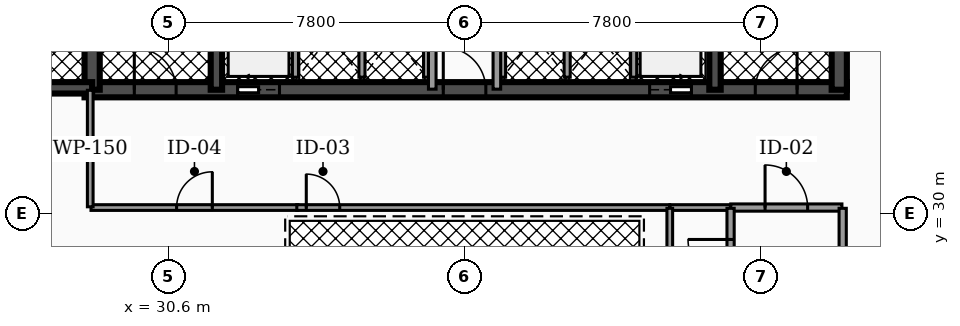
"""IFC4 building model, lengths in metres.
Left out: names, types, materials, properties, quantities, classifications, styles, units other than length and angle.
Written with IfcOpenShell. Run it as: python <this file> out.ifc"""

import sys

from ifc_helpers import new_model, si_unit, direction, frame, frame_2d, origin, place, context, subcontext, project, spatial, rectangle, extrude, element, fill, save


model = new_model("IFC4")
c1 = context("Model", 3, precision=1e-05, world=origin(), true_north=direction((0.0, 1.0)))
c2 = subcontext(c1, "Body", "Model", "MODEL_VIEW")
j1 = project(units=[si_unit("LENGTHUNIT", "METRE"), si_unit("PLANEANGLEUNIT", "RADIAN")], contexts=[c1])
p1 = place(None, origin())
s1 = spatial("IfcSite", under=j1, at=p1, CompositionType="ELEMENT")
p2 = place(p1, origin())
s2 = spatial("IfcBuilding", under=s1, at=p2, CompositionType="ELEMENT")
p3 = place(p2, frame((0.0, 0.0, 80.58)))
s3 = spatial("IfcBuildingStorey", under=s2, at=p3, CompositionType="ELEMENT", Elevation=80.58)
p4 = place(p3, frame((28.4, 33.25, 0.0), z_axis=(0.0, 0.0, 1.0), x_axis=(1.0, 0.0, 0.0)))
e1 = element("IfcWall", 1, at=p4, inside=s3, PredefinedType="SHEAR", context=c2, shape_type="SweptSolid", body=[
    extrude(rectangle(XDim=20.06, YDim=0.4, at=frame_2d((10.03, 0.0))), origin(), (0.0, 0.0, 1.0), 3.82),
])
p5 = place(p4, frame((4.03, 0.0, 0.0)))
e2 = element("IfcOpeningElement", 2, at=p5, cuts=e1, PredefinedType="OPENING", context=c2, shape_type="SweptSolid", body=[
    extrude(rectangle(XDim=1.1, YDim=2.15, at=frame_2d((0.55, 1.075))), frame((0.0, 0.21, 0.0), z_axis=(0.0, -1.0, 0.0), x_axis=(1.0, 0.0, 0.0)), (0.0, 0.0, 1.0), 0.42),
])
p6 = place(p4, frame((14.87, 0.0, 0.0)))
e3 = element("IfcOpeningElement", 3, at=p6, cuts=e1, PredefinedType="OPENING", context=c2, shape_type="SweptSolid", body=[
    extrude(rectangle(XDim=1.1, YDim=2.15, at=frame_2d((0.55, 1.075))), frame((0.0, 0.21, 0.0), z_axis=(0.0, -1.0, 0.0), x_axis=(1.0, 0.0, 0.0)), (0.0, 0.0, 1.0), 0.42),
])
p7 = place(p4, frame((1.31, 0.0, 0.0)))
e4 = element("IfcOpeningElement", 4, at=p7, cuts=e1, PredefinedType="OPENING", context=c2, shape_type="SweptSolid", body=[
    extrude(rectangle(XDim=1.1, YDim=2.2, at=frame_2d((0.55, 1.1))), frame((0.0, 0.21, 0.0), z_axis=(0.0, -1.0, 0.0), x_axis=(1.0, 0.0, 0.0)), (0.0, 0.0, 1.0), 0.42),
])
p8 = place(p4, frame((9.44, 0.0, 0.0)))
e5 = element("IfcOpeningElement", 5, at=p8, cuts=e1, PredefinedType="OPENING", context=c2, shape_type="SweptSolid", body=[
    extrude(rectangle(XDim=1.12, YDim=2.05, at=frame_2d((0.56, 1.025))), frame((0.0, 0.21, 0.0), z_axis=(0.0, -1.0, 0.0), x_axis=(1.0, 0.0, 0.0)), (0.0, 0.0, 1.0), 0.42),
])
p9 = place(p4, frame((17.65, 0.0, 0.0)))
e6 = element("IfcOpeningElement", 6, at=p9, cuts=e1, PredefinedType="OPENING", context=c2, shape_type="SweptSolid", body=[
    extrude(rectangle(XDim=1.1, YDim=2.2, at=frame_2d((0.55, 1.1))), frame((0.0, 0.21, 0.0), z_axis=(0.0, -1.0, 0.0), x_axis=(1.0, 0.0, 0.0)), (0.0, 0.0, 1.0), 0.42),
])
p10 = place(p3, frame((28.6, 33.25, 0.0), z_axis=(0.0, 0.0, 1.0), x_axis=(0.0, 1.0, 0.0)))
e7 = element("IfcWall", 7, at=p10, inside=s3, PredefinedType="SHEAR", context=c2, shape_type="SweptSolid", body=[
    extrude(rectangle(XDim=10.2, YDim=0.4, at=frame_2d((5.1, 0.0))), origin(), (0.0, 0.0, 1.0), 3.82),
])
for number, where, z_axis, x_axis in (
    (8, (31.87, 33.25, 0.0), (0.0, 0.0, 1.0), (0.0, 1.0, 0.0)),
    (9, (44.99, 33.25, 0.0), (0.0, 0.0, 1.0), (0.0, 1.0, 0.0)),
):
    element("IfcWall", number, at=place(p3, frame(where, z_axis=z_axis, x_axis=x_axis)), inside=s3, PredefinedType="SHEAR", context=c2, shape_type="SweptSolid", body=[
        extrude(rectangle(XDim=10.2, YDim=0.3, at=frame_2d((5.1, 0.0))), origin(), (0.0, 0.0, 1.0), 3.82),
    ])
p11 = place(p3, frame((48.26, 33.25, 0.0), z_axis=(0.0, 0.0, 1.0), x_axis=(0.0, 1.0, 0.0)))
e10 = element("IfcWall", 10, at=p11, inside=s3, PredefinedType="SHEAR", context=c2, shape_type="SweptSolid", body=[
    extrude(rectangle(XDim=10.2, YDim=0.4, at=frame_2d((5.1, 0.0))), origin(), (0.0, 0.0, 1.0), 3.82),
])
p12 = place(p3, frame((25.08, 33.3, 0.0), z_axis=(0.0, 0.0, 1.0), x_axis=(1.0, 0.0, 0.0)))
e11 = element("IfcWall", 11, at=p12, inside=s3, PredefinedType="SHEAR", context=c2, shape_type="SweptSolid", body=[
    extrude(rectangle(XDim=3.52, YDim=0.3, at=frame_2d((1.76, 0.0))), origin(), (0.0, 0.0, 1.0), 3.82),
])
p13 = place(p12, frame((1.335, 0.0, 0.0)))
e12 = element("IfcOpeningElement", 12, at=p13, cuts=e11, PredefinedType="OPENING", context=c2, shape_type="SweptSolid", body=[
    extrude(rectangle(XDim=0.95, YDim=2.2, at=frame_2d((0.475, 1.1))), frame((0.0, 0.16, 0.0), z_axis=(0.0, -1.0, 0.0), x_axis=(1.0, 0.0, 0.0)), (0.0, 0.0, 1.0), 0.32),
])
for number, where, z_axis, x_axis in (
    (13, (33.95, 33.58, 0.0), (0.0, 0.0, 1.0), (0.0, 1.0, 0.0)),
    (14, (42.85, 33.58, 0.0), (0.0, 0.0, 1.0), (0.0, 1.0, 0.0)),
):
    element("IfcWall", number, at=place(p3, frame(where, z_axis=z_axis, x_axis=x_axis)), inside=s3, PredefinedType="SOLIDWALL", context=c2, shape_type="SweptSolid", body=[
        extrude(rectangle(XDim=2.45, YDim=0.16, at=frame_2d((1.225, 0.0))), origin(), (0.0, 0.0, 1.0), 2.792),
    ])
for number, where, z_axis, x_axis in (
    (15, (35.7, 33.58, 0.0), (0.0, 0.0, 1.0), (0.0, 1.0, 0.0)),
    (16, (37.4, 33.58, 0.0), (0.0, 0.0, 1.0), (0.0, 1.0, 0.0)),
    (17, (39.4, 33.58, 0.0), (0.0, 0.0, 1.0), (0.0, 1.0, 0.0)),
    (18, (41.1, 33.58, 0.0), (0.0, 0.0, 1.0), (0.0, 1.0, 0.0)),
):
    element("IfcWall", number, at=place(p3, frame(where, z_axis=z_axis, x_axis=x_axis)), inside=s3, PredefinedType="SOLIDWALL", context=c2, shape_type="SweptSolid", body=[
        extrude(rectangle(XDim=2.25, YDim=0.16, at=frame_2d((1.125, 0.0))), origin(), (0.0, 0.0, 1.0), 2.792),
    ])
p14 = place(p3, frame((37.55, 33.265, 0.0), z_axis=(0.0, 0.0, 1.0), x_axis=(0.0, 1.0, 0.0)))
e19 = element("IfcWall", 19, at=p14, inside=s3, PredefinedType="PARTITIONING", context=c2, shape_type="SweptSolid", body=[
    extrude(rectangle(XDim=4.265, YDim=0.2, at=frame_2d((2.133, 0.0))), origin(), (0.0, 0.0, 1.0), 2.777),
])
p15 = place(p14, frame((3.093, 0.0, 0.0)))
e20 = element("IfcOpeningElement", 20, at=p15, cuts=e19, PredefinedType="OPENING", context=c2, shape_type="SweptSolid", body=[
    extrude(rectangle(XDim=0.88, YDim=2.05, at=frame_2d((0.44, 1.025))), frame((0.0, 0.11, 0.0), z_axis=(0.0, -1.0, 0.0), x_axis=(1.0, 0.0, 0.0)), (0.0, 0.0, 1.0), 0.22),
])
p16 = place(p3, frame((39.25, 33.265, 0.0), z_axis=(0.0, 0.0, 1.0), x_axis=(0.0, 1.0, 0.0)))
e21 = element("IfcWall", 21, at=p16, inside=s3, PredefinedType="PARTITIONING", context=c2, shape_type="SweptSolid", body=[
    extrude(rectangle(XDim=4.265, YDim=0.2, at=frame_2d((2.133, 0.0))), origin(), (0.0, 0.0, 1.0), 2.777),
])
p17 = place(p16, frame((3.093, 0.0, 0.0)))
e22 = element("IfcOpeningElement", 22, at=p17, cuts=e21, PredefinedType="OPENING", context=c2, shape_type="SweptSolid", body=[
    extrude(rectangle(XDim=0.88, YDim=2.05, at=frame_2d((0.44, 1.025))), frame((0.0, 0.11, 0.0), z_axis=(0.0, -1.0, 0.0), x_axis=(1.0, 0.0, 0.0)), (0.0, 0.0, 1.0), 0.22),
])
p18 = place(p3, frame((45.405, 30.15, 0.0), z_axis=(0.0, 0.0, 1.0), x_axis=(1.0, 0.0, 0.0)))
e23 = element("IfcWall", 23, at=p18, inside=s3, PredefinedType="PARTITIONING", context=c2, shape_type="SweptSolid", body=[
    extrude(rectangle(XDim=2.925, YDim=0.19, at=frame_2d((1.462, 0.0))), origin(), (0.0, 0.0, 1.0), 2.777),
])
p19 = place(p18, frame((0.903, 0.0, 0.0)))
e24 = element("IfcOpeningElement", 24, at=p19, cuts=e23, PredefinedType="OPENING", context=c2, shape_type="SweptSolid", body=[
    extrude(rectangle(XDim=1.12, YDim=2.05, at=frame_2d((0.56, 1.025))), frame((0.0, 0.105, 0.0), z_axis=(0.0, -1.0, 0.0), x_axis=(1.0, 0.0, 0.0)), (0.0, 0.0, 1.0), 0.21),
])
p20 = place(p3, frame((43.805, 30.15, 0.0), z_axis=(0.0, 0.0, 1.0), x_axis=(1.0, 0.0, 0.0)))
e25 = element("IfcWall", 25, at=p20, inside=s3, PredefinedType="PARTITIONING", context=c2, shape_type="SweptSolid", body=[
    extrude(rectangle(XDim=1.59, YDim=0.15, at=frame_2d((0.795, 0.0))), origin(), (0.0, 0.0, 1.0), 2.777),
])
p21 = place(p3, frame((28.57, 30.15, 0.0), z_axis=(0.0, 0.0, 1.0), x_axis=(1.0, 0.0, 0.0)))
e26 = element("IfcWall", 26, at=p21, inside=s3, PredefinedType="PARTITIONING", context=c2, shape_type="SweptSolid", body=[
    extrude(rectangle(XDim=5.445, YDim=0.15, at=frame_2d((2.722, 0.0))), origin(), (0.0, 0.0, 1.0), 2.777),
])
p22 = place(p21, frame((2.252, 0.0, 0.0)))
e27 = element("IfcOpeningElement", 27, at=p22, cuts=e26, PredefinedType="OPENING", context=c2, shape_type="SweptSolid", body=[
    extrude(rectangle(XDim=0.94, YDim=2.05, at=frame_2d((0.47, 1.025))), frame((0.0, 0.085, 0.0), z_axis=(0.0, -1.0, 0.0), x_axis=(1.0, 0.0, 0.0)), (0.0, 0.0, 1.0), 0.17),
])
p23 = place(p3, frame((28.55, 30.17, 0.0), z_axis=(0.0, 0.0, 1.0), x_axis=(0.0, 1.0, 0.0)))
e28 = element("IfcWall", 28, at=p23, inside=s3, PredefinedType="PARTITIONING", context=c2, shape_type="SweptSolid", body=[
    extrude(rectangle(XDim=3.065, YDim=0.15, at=frame_2d((1.533, 0.0))), origin(), (0.0, 0.0, 1.0), 2.777),
])
p24 = place(p3, frame((33.985, 30.15, 0.0), z_axis=(0.0, 0.0, 1.0), x_axis=(1.0, 0.0, 0.0)))
e29 = element("IfcWall", 29, at=p24, inside=s3, PredefinedType="PARTITIONING", context=c2, shape_type="SweptSolid", body=[
    extrude(rectangle(XDim=9.81, YDim=0.15, at=frame_2d((4.905, 0.0))), origin(), (0.0, 0.0, 1.0), 2.777),
])
p25 = place(p24, frame((0.25, 0.0, 0.0)))
e30 = element("IfcOpeningElement", 30, at=p25, cuts=e29, PredefinedType="OPENING", context=c2, shape_type="SweptSolid", body=[
    extrude(rectangle(XDim=0.88, YDim=2.05, at=frame_2d((0.44, 1.025))), frame((0.0, 0.085, 0.0), z_axis=(0.0, -1.0, 0.0), x_axis=(1.0, 0.0, 0.0)), (0.0, 0.0, 1.0), 0.17),
])
p26 = place(p3, frame((45.4, 27.37, 0.0), z_axis=(0.0, 0.0, 1.0), x_axis=(0.0, 1.0, 0.0)))
e31 = element("IfcWall", 31, at=p26, inside=s3, PredefinedType="PARTITIONING", context=c2, shape_type="SweptSolid", body=[
    extrude(rectangle(XDim=2.76, YDim=0.19, at=frame_2d((1.38, 0.0))), origin(), (0.0, 0.0, 1.0), 2.777),
])
p27 = place(p26, frame((0.82, 0.0, 0.0)))
e32 = element("IfcOpeningElement", 32, at=p27, cuts=e31, PredefinedType="OPENING", context=c2, shape_type="SweptSolid", body=[
    extrude(rectangle(XDim=1.12, YDim=2.05, at=frame_2d((0.56, 1.025))), frame((0.0, 0.105, 0.0), z_axis=(0.0, -1.0, 0.0), x_axis=(1.0, 0.0, 0.0)), (0.0, 0.0, 1.0), 0.21),
])
p28 = place(p3, frame((48.35, 27.37, 0.0), z_axis=(0.0, 0.0, 1.0), x_axis=(0.0, 1.0, 0.0)))
e33 = element("IfcWall", 33, at=p28, inside=s3, PredefinedType="PARTITIONING", context=c2, shape_type="SweptSolid", body=[
    extrude(rectangle(XDim=2.76, YDim=0.19, at=frame_2d((1.38, 0.0))), origin(), (0.0, 0.0, 1.0), 2.777),
])
p29 = place(p3, frame((43.8, 23.62, 0.0), z_axis=(0.0, 0.0, 1.0), x_axis=(0.0, 1.0, 0.0)))
e34 = element("IfcWall", 34, at=p29, inside=s3, PredefinedType="PARTITIONING", context=c2, shape_type="SweptSolid", body=[
    extrude(rectangle(XDim=6.51, YDim=0.15, at=frame_2d((3.255, 0.0))), origin(), (0.0, 0.0, 1.0), 2.777),
])
p30 = place(p5, origin())
e35 = element("IfcDoor", 35, at=p30, inside=s3, OperationType="SLIDING_TO_LEFT", PredefinedType="DOOR", context=c2, shape_type="SweptSolid", body=[
    extrude(rectangle(XDim=1.1, YDim=2.15, at=frame_2d((0.55, 1.075))), frame((0.0, 0.025, 0.0), z_axis=(0.0, -1.0, 0.0), x_axis=(1.0, 0.0, 0.0)), (0.0, 0.0, 1.0), 0.05),
])
fill(e2, e35)
p31 = place(p6, origin())
e36 = element("IfcDoor", 36, at=p31, inside=s3, OperationType="SLIDING_TO_RIGHT", PredefinedType="DOOR", context=c2, shape_type="SweptSolid", body=[
    extrude(rectangle(XDim=1.1, YDim=2.15, at=frame_2d((0.55, 1.075))), frame((0.0, 0.025, 0.0), z_axis=(0.0, -1.0, 0.0), x_axis=(1.0, 0.0, 0.0)), (0.0, 0.0, 1.0), 0.05),
])
fill(e3, e36)
p32 = place(p7, origin())
e37 = element("IfcDoor", 37, at=p32, inside=s3, OperationType="SINGLE_SWING_LEFT", PredefinedType="DOOR", context=c2, shape_type="SweptSolid", body=[
    extrude(rectangle(XDim=1.1, YDim=2.2, at=frame_2d((0.55, 1.1))), frame((0.0, 0.025, 0.0), z_axis=(0.0, -1.0, 0.0), x_axis=(1.0, 0.0, 0.0)), (0.0, 0.0, 1.0), 0.05),
])
fill(e4, e37)
p33 = place(p8, origin())
e38 = element("IfcDoor", 38, at=p33, inside=s3, OperationType="SINGLE_SWING_LEFT", PredefinedType="DOOR", context=c2, shape_type="SweptSolid", body=[
    extrude(rectangle(XDim=1.12, YDim=2.05, at=frame_2d((0.56, 1.025))), frame((0.0, 0.025, 0.0), z_axis=(0.0, -1.0, 0.0), x_axis=(1.0, 0.0, 0.0)), (0.0, 0.0, 1.0), 0.05),
])
fill(e5, e38)
p34 = place(p9, origin())
e39 = element("IfcDoor", 39, at=p34, inside=s3, OperationType="SINGLE_SWING_RIGHT", PredefinedType="DOOR", context=c2, shape_type="SweptSolid", body=[
    extrude(rectangle(XDim=1.1, YDim=2.2, at=frame_2d((0.55, 1.1))), frame((0.0, 0.025, 0.0), z_axis=(0.0, -1.0, 0.0), x_axis=(1.0, 0.0, 0.0)), (0.0, 0.0, 1.0), 0.05),
])
fill(e6, e39)
p35 = place(p19, origin())
e40 = element("IfcDoor", 40, at=p35, inside=s3, OperationType="SINGLE_SWING_LEFT", PredefinedType="DOOR", context=c2, shape_type="SweptSolid", body=[
    extrude(rectangle(XDim=1.12, YDim=2.05, at=frame_2d((0.56, 1.025))), frame((0.0, 0.025, 0.0), z_axis=(0.0, -1.0, 0.0), x_axis=(1.0, 0.0, 0.0)), (0.0, 0.0, 1.0), 0.05),
])
fill(e24, e40)
p36 = place(p22, origin())
e41 = element("IfcDoor", 41, at=p36, inside=s3, OperationType="SINGLE_SWING_RIGHT", PredefinedType="DOOR", context=c2, shape_type="SweptSolid", body=[
    extrude(rectangle(XDim=0.94, YDim=2.05, at=frame_2d((0.47, 1.025))), frame((0.0, 0.025, 0.0), z_axis=(0.0, -1.0, 0.0), x_axis=(1.0, 0.0, 0.0)), (0.0, 0.0, 1.0), 0.05),
])
fill(e27, e41)
p37 = place(p25, origin())
e42 = element("IfcDoor", 42, at=p37, inside=s3, OperationType="SINGLE_SWING_LEFT", PredefinedType="DOOR", context=c2, shape_type="SweptSolid", body=[
    extrude(rectangle(XDim=0.88, YDim=2.05, at=frame_2d((0.44, 1.025))), frame((0.0, 0.025, 0.0), z_axis=(0.0, -1.0, 0.0), x_axis=(1.0, 0.0, 0.0)), (0.0, 0.0, 1.0), 0.05),
])
fill(e30, e42)
p38 = place(p27, origin())
e43 = element("IfcDoor", 43, at=p38, inside=s3, OperationType="SINGLE_SWING_RIGHT", PredefinedType="DOOR", context=c2, shape_type="SweptSolid", body=[
    extrude(rectangle(XDim=1.12, YDim=2.05, at=frame_2d((0.56, 1.025))), frame((0.0, 0.025, 0.0), z_axis=(0.0, -1.0, 0.0), x_axis=(1.0, 0.0, 0.0)), (0.0, 0.0, 1.0), 0.05),
])
fill(e32, e43)
save(model, sys.argv[1])
